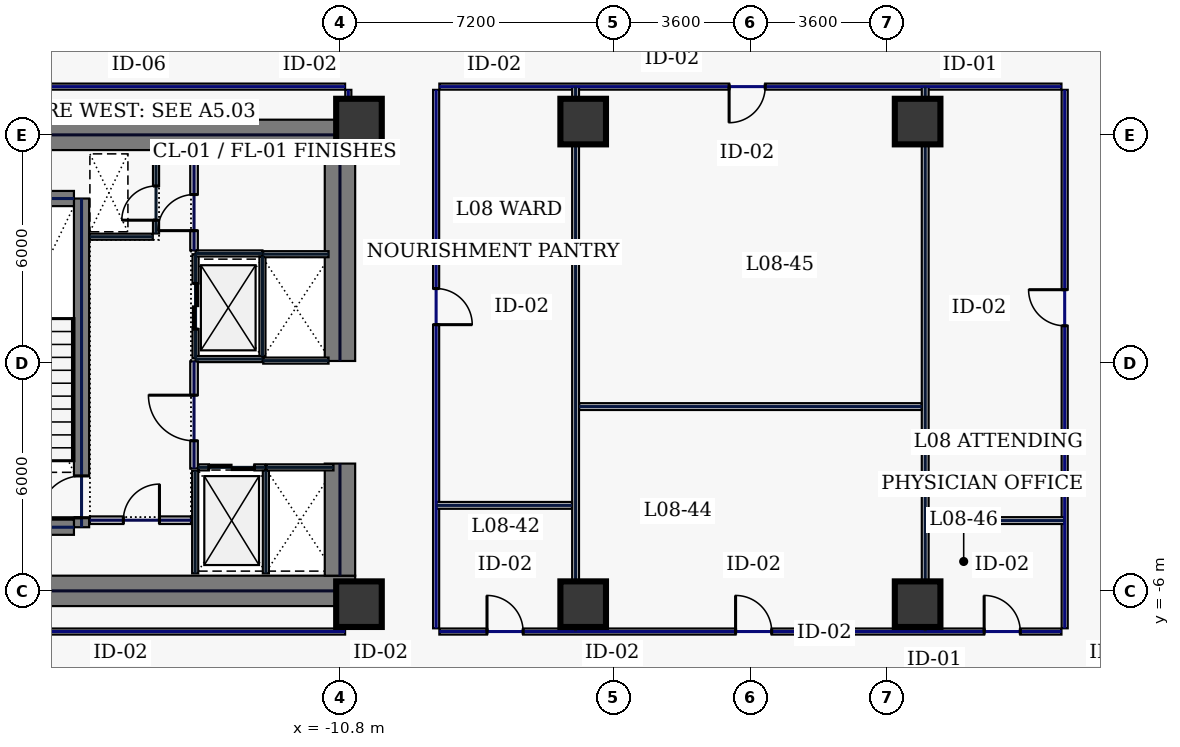
"""IFC4 building model, lengths in metres.
Left out: names, types, materials, properties, quantities, classifications, styles, units other than length and angle.
Written with IfcOpenShell. Run it as: python <this file> out.ifc"""

import sys

from ifc_helpers import new_model, si_unit, direction, frame, frame_2d, origin, origin_2d, place, context, subcontext, project, spatial, rectangle, hollow_rectangle, extrude, element, fill, save


model = new_model("IFC4")
c1 = context("Model", 3, precision=1e-05, world=origin(), true_north=direction((0.0, 1.0)))
c2 = subcontext(c1, "Body", "Model", "MODEL_VIEW")
j1 = project(units=[si_unit("LENGTHUNIT", "METRE"), si_unit("PLANEANGLEUNIT", "RADIAN")], contexts=[c1])
p1 = place(None, origin())
s1 = spatial("IfcSite", under=j1, at=p1, CompositionType="ELEMENT")
p2 = place(p1, origin())
s2 = spatial("IfcBuilding", under=s1, at=p2, CompositionType="ELEMENT")
p3 = place(p2, frame((0.0, 0.0, 43.4)))
s3 = spatial("IfcBuildingStorey", under=s2, at=p3, CompositionType="ELEMENT", Elevation=43.4)
for number, where, z_axis, x_axis in (
    (1, (-22.0, 6.0, 0.0), (0.0, 0.0, 1.0), (1.0, 0.0, 0.0)),
    (2, (-22.0, -6.0, 0.0), (0.0, 0.0, 1.0), (1.0, 0.0, 0.0)),
):
    element("IfcWall", number, at=place(p3, frame(where, z_axis=z_axis, x_axis=x_axis)), inside=s3, PredefinedType="SHEAR", context=c2, shape_type="SweptSolid", body=[
        extrude(rectangle(XDim=11.6, YDim=0.8, at=frame_2d((5.8, 0.0))), origin(), (0.0, 0.0, 1.0), 3.74),
    ])
p4 = place(p3, frame((-10.8, -5.6, 0.0), z_axis=(0.0, 0.0, 1.0), x_axis=(0.0, 1.0, 0.0)))
e3 = element("IfcWall", 3, at=p4, inside=s3, PredefinedType="SHEAR", context=c2, shape_type="SweptSolid", body=[
    extrude(rectangle(XDim=2.95, YDim=0.8, at=frame_2d((1.475, 0.0))), origin(), (0.0, 0.0, 1.0), 3.74),
])
p5 = place(p3, frame((-10.8, 0.05, 0.0), z_axis=(0.0, 0.0, 1.0), x_axis=(0.0, 1.0, 0.0)))
e4 = element("IfcWall", 4, at=p5, inside=s3, PredefinedType="SHEAR", context=c2, shape_type="SweptSolid", body=[
    extrude(rectangle(XDim=5.55, YDim=0.8, at=frame_2d((2.775, 0.0))), origin(), (0.0, 0.0, 1.0), 3.74),
])
p6 = place(p3, frame((-17.6, -4.325, 0.0), z_axis=(0.0, 0.0, 1.0), x_axis=(0.0, 1.0, 0.0)))
e5 = element("IfcWall", 5, at=p6, inside=s3, PredefinedType="SHEAR", context=c2, shape_type="SweptSolid", body=[
    extrude(rectangle(XDim=8.65, YDim=0.4, at=frame_2d((4.325, 0.0))), origin(), (0.0, 0.0, 1.0), 3.74),
])
p7 = place(p6, frame((0.25, 0.0, 0.0)))
e6 = element("IfcOpeningElement", 6, at=p7, cuts=e5, PredefinedType="OPENING", context=c2, shape_type="SweptSolid", body=[
    extrude(rectangle(XDim=1.1, YDim=2.2, at=frame_2d((0.55, 1.1))), frame((0.0, 0.21, 0.0), z_axis=(0.0, -1.0, 0.0), x_axis=(1.0, 0.0, 0.0)), (0.0, 0.0, 1.0), 0.42),
])
for number, where, z_axis, x_axis in (
    (7, (-21.2, -4.325, 0.0), (0.0, 0.0, 1.0), (1.0, 0.0, 0.0)),
    (8, (-21.2, 4.325, 0.0), (0.0, 0.0, 1.0), (1.0, 0.0, 0.0)),
):
    element("IfcWall", number, at=place(p3, frame(where, z_axis=z_axis, x_axis=x_axis)), inside=s3, PredefinedType="SHEAR", context=c2, shape_type="SweptSolid", body=[
        extrude(rectangle(XDim=3.4, YDim=0.4, at=frame_2d((1.7, 0.0))), origin(), (0.0, 0.0, 1.0), 3.74),
    ])
for number, where, z_axis, x_axis in (
    (9, (-10.3, -6.35, 0.0), (0.0, 0.0, 1.0), (1.0, 0.0, 0.0)),
    (10, (-10.3, 6.35, 0.0), (0.0, 0.0, 1.0), (1.0, 0.0, 0.0)),
    (11, (-4.4, -6.35, 0.0), (0.0, 0.0, 1.0), (1.0, 0.0, 0.0)),
    (12, (4.4, -6.35, 0.0), (0.0, 0.0, 1.0), (1.0, 0.0, 0.0)),
    (13, (-4.4, 6.35, 0.0), (0.0, 0.0, 1.0), (1.0, 0.0, 0.0)),
    (14, (4.4, 6.35, 0.0), (0.0, 0.0, 1.0), (1.0, 0.0, 0.0)),
):
    element("IfcColumn", number, at=place(p3, frame(where, z_axis=z_axis, x_axis=x_axis)), inside=s3, PredefinedType="COLUMN", context=c2, shape_type="SweptSolid", body=[
        extrude(hollow_rectangle(XDim=1.2, YDim=1.2, WallThickness=0.05, at=origin_2d()), origin(), (0.0, 0.0, 1.0), 3.74),
    ])
p8 = place(p3, frame((-14.6, 0.12, 0.0), z_axis=(0.0, 0.0, 1.0), x_axis=(0.0, 1.0, 0.0)))
e15 = element("IfcWall", 15, at=p8, inside=s3, PredefinedType="PARTITIONING", context=c2, shape_type="SweptSolid", body=[
    extrude(rectangle(XDim=2.74, YDim=0.16, at=frame_2d((1.37, 0.0))), origin(), (0.0, 0.0, 1.0), 3.74),
])
p9 = place(p8, frame((0.77, 0.0, 0.0)))
e16 = element("IfcOpeningElement", 16, at=p9, cuts=e15, PredefinedType="OPENING", context=c2, shape_type="SweptSolid", body=[
    extrude(rectangle(XDim=1.2, YDim=2.2, at=frame_2d((0.6, 1.1))), frame((0.0, 0.09, 0.0), z_axis=(0.0, -1.0, 0.0), x_axis=(1.0, 0.0, 0.0)), (0.0, 0.0, 1.0), 0.18),
])
for number, where, z_axis, x_axis in (
    (17, (-14.6, 0.1, 0.0), (0.0, 0.0, 1.0), (1.0, 0.0, 0.0)),
    (18, (-14.6, 2.88, 0.0), (0.0, 0.0, 1.0), (1.0, 0.0, 0.0)),
):
    element("IfcWall", number, at=place(p3, frame(where, z_axis=z_axis, x_axis=x_axis)), inside=s3, PredefinedType="PARTITIONING", context=c2, shape_type="SweptSolid", body=[
        extrude(rectangle(XDim=1.76, YDim=0.16, at=frame_2d((0.88, 0.0))), origin(), (0.0, 0.0, 1.0), 3.74),
    ])
p10 = place(p3, frame((-12.84, 0.18, 0.0), z_axis=(0.0, 0.0, 1.0), x_axis=(0.0, 1.0, 0.0)))
e19 = element("IfcWall", 19, at=p10, inside=s3, PredefinedType="PARTITIONING", context=c2, shape_type="SweptSolid", body=[
    extrude(rectangle(XDim=2.62, YDim=0.16, at=frame_2d((1.31, 0.0))), origin(), (0.0, 0.0, 1.0), 3.74),
])
p11 = place(p3, frame((-14.53, -2.75, 0.0), z_axis=(0.0, 0.0, 1.0), x_axis=(1.0, 0.0, 0.0)))
e20 = element("IfcWall", 20, at=p11, inside=s3, PredefinedType="PARTITIONING", context=c2, shape_type="SweptSolid", body=[
    extrude(rectangle(XDim=1.76, YDim=0.16, at=frame_2d((0.88, 0.0))), origin(), (0.0, 0.0, 1.0), 3.74),
])
p12 = place(p11, frame((0.28, 0.0, 0.0)))
e21 = element("IfcOpeningElement", 21, at=p12, cuts=e20, PredefinedType="OPENING", context=c2, shape_type="SweptSolid", body=[
    extrude(rectangle(XDim=1.2, YDim=2.2, at=frame_2d((0.6, 1.1))), frame((0.0, 0.09, 0.0), z_axis=(0.0, -1.0, 0.0), x_axis=(1.0, 0.0, 0.0)), (0.0, 0.0, 1.0), 0.18),
])
for number, where, z_axis, x_axis in (
    (22, (-12.75, -5.54, 0.0), (0.0, 0.0, 1.0), (0.0, 1.0, 0.0)),
    (23, (-14.61, -5.54, 0.0), (0.0, 0.0, 1.0), (0.0, 1.0, 0.0)),
):
    element("IfcWall", number, at=place(p3, frame(where, z_axis=z_axis, x_axis=x_axis)), inside=s3, PredefinedType="PARTITIONING", context=c2, shape_type="SweptSolid", body=[
        extrude(rectangle(XDim=2.7, YDim=0.16, at=frame_2d((1.35, 0.0))), origin(), (0.0, 0.0, 1.0), 3.74),
    ])
p13 = place(p3, frame((-12.73, -2.75, 0.0), z_axis=(0.0, 0.0, 1.0), x_axis=(1.0, 0.0, 0.0)))
e24 = element("IfcWall", 24, at=p13, inside=s3, PredefinedType="PARTITIONING", context=c2, shape_type="SweptSolid", body=[
    extrude(rectangle(XDim=1.76, YDim=0.16, at=frame_2d((0.88, 0.0))), origin(), (0.0, 0.0, 1.0), 3.74),
])
for number, where, z_axis, x_axis in (
    (25, (-12.82, 0.06, 0.0), (0.0, 0.0, 1.0), (1.0, 0.0, 0.0)),
    (26, (-12.82, 2.86, 0.0), (0.0, 0.0, 1.0), (1.0, 0.0, 0.0)),
):
    element("IfcWall", number, at=place(p3, frame(where, z_axis=z_axis, x_axis=x_axis)), inside=s3, PredefinedType="PARTITIONING", context=c2, shape_type="SweptSolid", body=[
        extrude(rectangle(XDim=1.72, YDim=0.16, at=frame_2d((0.86, 0.0))), origin(), (0.0, 0.0, 1.0), 3.74),
    ])
p14 = place(p3, frame((-15.64, 3.405, 0.0), z_axis=(0.0, 0.0, 1.0), x_axis=(0.0, 1.0, 0.0)))
e27 = element("IfcWall", 27, at=p14, inside=s3, PredefinedType="PARTITIONING", context=c2, shape_type="SweptSolid", body=[
    extrude(rectangle(XDim=2.155, YDim=0.16, at=frame_2d((1.078, 0.0))), origin(), (0.0, 0.0, 1.0), 3.74),
])
p15 = place(p14, frame((0.35, 0.0, 0.0)))
e28 = element("IfcOpeningElement", 28, at=p15, cuts=e27, PredefinedType="OPENING", context=c2, shape_type="SweptSolid", body=[
    extrude(rectangle(XDim=0.9, YDim=2.2, at=frame_2d((0.45, 1.1))), frame((0.0, 0.09, 0.0), z_axis=(0.0, -1.0, 0.0), x_axis=(1.0, 0.0, 0.0)), (0.0, 0.0, 1.0), 0.18),
])
p16 = place(p3, frame((-17.38, 3.32, 0.0), z_axis=(0.0, 0.0, 1.0), x_axis=(1.0, 0.0, 0.0)))
e29 = element("IfcWall", 29, at=p16, inside=s3, PredefinedType="PARTITIONING", context=c2, shape_type="SweptSolid", body=[
    extrude(rectangle(XDim=1.655, YDim=0.16, at=frame_2d((0.827, 0.0))), origin(), (0.0, 0.0, 1.0), 3.74),
])
p17 = place(p3, frame((-17.38, -4.14, 0.0), z_axis=(0.0, 0.0, 1.0), x_axis=(1.0, 0.0, 0.0)))
e30 = element("IfcWall", 30, at=p17, inside=s3, PredefinedType="SOLIDWALL", context=c2, shape_type="SweptSolid", body=[
    extrude(rectangle(XDim=2.66, YDim=0.2, at=frame_2d((1.33, 0.0))), origin(), (0.0, 0.0, 1.0), 3.74),
])
p18 = place(p17, frame((0.88, 0.0, 0.0)))
e31 = element("IfcOpeningElement", 31, at=p18, cuts=e30, PredefinedType="OPENING", context=c2, shape_type="SweptSolid", body=[
    extrude(rectangle(XDim=0.95, YDim=2.2, at=frame_2d((0.475, 1.1))), frame((0.0, 0.11, 0.0), z_axis=(0.0, -1.0, 0.0), x_axis=(1.0, 0.0, 0.0)), (0.0, 0.0, 1.0), 0.22),
])
p19 = place(p3, frame((-14.64, 2.96, 0.0), z_axis=(0.0, 0.0, 1.0), x_axis=(0.0, 1.0, 0.0)))
e32 = element("IfcWall", 32, at=p19, inside=s3, PredefinedType="SOLIDWALL", context=c2, shape_type="SweptSolid", body=[
    extrude(rectangle(XDim=2.6, YDim=0.2, at=frame_2d((1.3, 0.0))), origin(), (0.0, 0.0, 1.0), 3.74),
])
p20 = place(p19, frame((0.52, 0.0, 0.0)))
e33 = element("IfcOpeningElement", 33, at=p20, cuts=e32, PredefinedType="OPENING", context=c2, shape_type="SweptSolid", body=[
    extrude(rectangle(XDim=0.95, YDim=2.2, at=frame_2d((0.475, 1.1))), frame((0.0, 0.11, 0.0), z_axis=(0.0, -1.0, 0.0), x_axis=(1.0, 0.0, 0.0)), (0.0, 0.0, 1.0), 0.22),
])
p21 = place(p3, frame((-14.64, -2.78, 0.0), z_axis=(0.0, 0.0, 1.0), x_axis=(0.0, 1.0, 0.0)))
e34 = element("IfcWall", 34, at=p21, inside=s3, PredefinedType="SOLIDWALL", context=c2, shape_type="SweptSolid", body=[
    extrude(rectangle(XDim=2.82, YDim=0.2, at=frame_2d((1.41, 0.0))), origin(), (0.0, 0.0, 1.0), 3.74),
])
p22 = place(p21, frame((0.73, 0.0, 0.0)))
e35 = element("IfcOpeningElement", 35, at=p22, cuts=e34, PredefinedType="OPENING", context=c2, shape_type="SweptSolid", body=[
    extrude(rectangle(XDim=1.2, YDim=2.2, at=frame_2d((0.6, 1.1))), frame((0.0, 0.11, 0.0), z_axis=(0.0, -1.0, 0.0), x_axis=(1.0, 0.0, 0.0)), (0.0, 0.0, 1.0), 0.22),
])
p23 = place(p3, frame((8.27, -6.985, 0.0), z_axis=(0.0, 0.0, 1.0), x_axis=(0.0, 1.0, 0.0)))
e36 = element("IfcWall", 36, at=p23, inside=s3, PredefinedType="PARTITIONING", context=c2, shape_type="SweptSolid", body=[
    extrude(rectangle(XDim=14.17, YDim=0.16, at=frame_2d((7.085, 0.0))), origin(), (0.0, 0.0, 1.0), 3.74),
])
p24 = place(p23, frame((7.961, 0.0, 0.0)))
e37 = element("IfcOpeningElement", 37, at=p24, cuts=e36, PredefinedType="OPENING", context=c2, shape_type="SweptSolid", body=[
    extrude(rectangle(XDim=0.95, YDim=2.2, at=frame_2d((0.475, 1.1))), frame((0.0, 0.09, 0.0), z_axis=(0.0, -1.0, 0.0), x_axis=(1.0, 0.0, 0.0)), (0.0, 0.0, 1.0), 0.18),
])
p25 = place(p3, frame((8.185, 7.27, 0.0), z_axis=(0.0, 0.0, 1.0), x_axis=(-1.0, 0.0, 0.0)))
e38 = element("IfcWall", 38, at=p25, inside=s3, PredefinedType="PARTITIONING", context=c2, shape_type="SweptSolid", body=[
    extrude(rectangle(XDim=16.37, YDim=0.16, at=frame_2d((8.185, 0.0))), origin(), (0.0, 0.0, 1.0), 3.74),
])
p26 = place(p25, frame((7.795, 0.0, 0.0)))
e39 = element("IfcOpeningElement", 39, at=p26, cuts=e38, PredefinedType="OPENING", context=c2, shape_type="SweptSolid", body=[
    extrude(rectangle(XDim=0.95, YDim=2.2, at=frame_2d((0.475, 1.1))), frame((0.0, 0.09, 0.0), z_axis=(0.0, -1.0, 0.0), x_axis=(1.0, 0.0, 0.0)), (0.0, 0.0, 1.0), 0.18),
])
p27 = place(p3, frame((-8.27, 7.185, 0.0), z_axis=(0.0, 0.0, 1.0), x_axis=(0.0, -1.0, 0.0)))
e40 = element("IfcWall", 40, at=p27, inside=s3, PredefinedType="PARTITIONING", context=c2, shape_type="SweptSolid", body=[
    extrude(rectangle(XDim=14.17, YDim=0.16, at=frame_2d((7.085, 0.0))), origin(), (0.0, 0.0, 1.0), 3.74),
])
p28 = place(p27, frame((5.229, 0.0, 0.0)))
e41 = element("IfcOpeningElement", 41, at=p28, cuts=e40, PredefinedType="OPENING", context=c2, shape_type="SweptSolid", body=[
    extrude(rectangle(XDim=0.95, YDim=2.2, at=frame_2d((0.475, 1.1))), frame((0.0, 0.09, 0.0), z_axis=(0.0, -1.0, 0.0), x_axis=(1.0, 0.0, 0.0)), (0.0, 0.0, 1.0), 0.18),
])
p29 = place(p3, frame((-8.185, -7.07, 0.0), z_axis=(0.0, 0.0, 1.0), x_axis=(1.0, 0.0, 0.0)))
e42 = element("IfcWall", 42, at=p29, inside=s3, PredefinedType="PARTITIONING", context=c2, shape_type="SweptSolid", body=[
    extrude(rectangle(XDim=16.37, YDim=0.16, at=frame_2d((8.185, 0.0))), origin(), (0.0, 0.0, 1.0), 3.74),
])
p30 = place(p29, frame((1.254, 0.0, 0.0)))
e43 = element("IfcOpeningElement", 43, at=p30, cuts=e42, PredefinedType="OPENING", context=c2, shape_type="SweptSolid", body=[
    extrude(rectangle(XDim=0.95, YDim=2.2, at=frame_2d((0.475, 1.1))), frame((0.0, 0.09, 0.0), z_axis=(0.0, -1.0, 0.0), x_axis=(1.0, 0.0, 0.0)), (0.0, 0.0, 1.0), 0.18),
])
p31 = place(p29, frame((7.795, 0.0, 0.0)))
e44 = element("IfcOpeningElement", 44, at=p31, cuts=e42, PredefinedType="OPENING", context=c2, shape_type="SweptSolid", body=[
    extrude(rectangle(XDim=0.95, YDim=2.2, at=frame_2d((0.475, 1.1))), frame((0.0, 0.09, 0.0), z_axis=(0.0, -1.0, 0.0), x_axis=(1.0, 0.0, 0.0)), (0.0, 0.0, 1.0), 0.18),
])
p32 = place(p29, frame((14.336, 0.0, 0.0)))
e45 = element("IfcOpeningElement", 45, at=p32, cuts=e42, PredefinedType="OPENING", context=c2, shape_type="SweptSolid", body=[
    extrude(rectangle(XDim=0.95, YDim=2.2, at=frame_2d((0.475, 1.1))), frame((0.0, 0.09, 0.0), z_axis=(0.0, -1.0, 0.0), x_axis=(1.0, 0.0, 0.0)), (0.0, 0.0, 1.0), 0.18),
])
p33 = place(p3, frame((-10.58, -6.985, 0.0), z_axis=(0.0, 0.0, 1.0), x_axis=(0.0, 1.0, 0.0)))
e46 = element("IfcWall", 46, at=p33, inside=s3, PredefinedType="PARTITIONING", context=c2, shape_type="SweptSolid", body=[
    extrude(rectangle(XDim=0.565, YDim=0.16, at=frame_2d((0.283, 0.0))), origin(), (0.0, 0.0, 1.0), 1.535),
])
p34 = place(p3, frame((-10.58, 6.42, 0.0), z_axis=(0.0, 0.0, 1.0), x_axis=(0.0, 1.0, 0.0)))
e47 = element("IfcWall", 47, at=p34, inside=s3, PredefinedType="PARTITIONING", context=c2, shape_type="SweptSolid", body=[
    extrude(rectangle(XDim=0.765, YDim=0.16, at=frame_2d((0.383, 0.0))), origin(), (0.0, 0.0, 1.0), 3.74),
])
for number, where, z_axis, x_axis in (
    (48, (-10.665, 7.27, 0.0), (0.0, 0.0, 1.0), (-1.0, 0.0, 0.0)),
    (49, (-27.185, -7.07, 0.0), (0.0, 0.0, 1.0), (1.0, 0.0, 0.0)),
):
    element("IfcWall", number, at=place(p3, frame(where, z_axis=z_axis, x_axis=x_axis)), inside=s3, PredefinedType="PARTITIONING", context=c2, shape_type="SweptSolid", body=[
        extrude(rectangle(XDim=16.52, YDim=0.16, at=frame_2d((8.26, 0.0))), origin(), (0.0, 0.0, 1.0), 3.74),
    ])
for number, where, z_axis, x_axis in (
    (50, (-4.6, -7.065, 0.0), (0.0, 0.0, 1.0), (0.0, 1.0, 0.0)),
    (51, (4.6, -7.065, 0.0), (0.0, 0.0, 1.0), (0.0, 1.0, 0.0)),
):
    element("IfcWall", number, at=place(p3, frame(where, z_axis=z_axis, x_axis=x_axis)), inside=s3, PredefinedType="PARTITIONING", context=c2, shape_type="SweptSolid", body=[
        extrude(rectangle(XDim=14.33, YDim=0.18, at=frame_2d((7.165, 0.0))), origin(), (0.0, 0.0, 1.0), 2.935),
    ])
p35 = place(p3, frame((-4.505, -1.15, 0.0), z_axis=(0.0, 0.0, 1.0), x_axis=(1.0, 0.0, 0.0)))
e52 = element("IfcWall", 52, at=p35, inside=s3, PredefinedType="PARTITIONING", context=c2, shape_type="SweptSolid", body=[
    extrude(rectangle(XDim=9.01, YDim=0.18, at=frame_2d((4.505, 0.0))), origin(), (0.0, 0.0, 1.0), 3.74),
])
for number, where, z_axis, x_axis in (
    (53, (-8.265, -3.75, 0.0), (0.0, 0.0, 1.0), (1.0, 0.0, 0.0)),
    (54, (4.695, -4.15, 0.0), (0.0, 0.0, 1.0), (1.0, 0.0, 0.0)),
):
    element("IfcWall", number, at=place(p3, frame(where, z_axis=z_axis, x_axis=x_axis)), inside=s3, PredefinedType="PARTITIONING", context=c2, shape_type="SweptSolid", body=[
        extrude(rectangle(XDim=3.57, YDim=0.18, at=frame_2d((1.785, 0.0))), origin(), (0.0, 0.0, 1.0), 3.74),
    ])
p36 = place(p7, origin())
e55 = element("IfcDoor", 55, at=p36, inside=s3, OperationType="SINGLE_SWING_LEFT", PredefinedType="DOOR", context=c2, shape_type="SweptSolid", body=[
    extrude(rectangle(XDim=1.1, YDim=2.2, at=frame_2d((0.55, 1.1))), frame((0.0, 0.025, 0.0), z_axis=(0.0, -1.0, 0.0), x_axis=(1.0, 0.0, 0.0)), (0.0, 0.0, 1.0), 0.05),
])
fill(e6, e55)
p37 = place(p9, origin())
e56 = element("IfcDoor", 56, at=p37, inside=s3, OperationType="SLIDING_TO_LEFT", PredefinedType="DOOR", context=c2, shape_type="SweptSolid", body=[
    extrude(rectangle(XDim=1.2, YDim=2.2, at=frame_2d((0.6, 1.1))), frame((0.0, 0.025, 0.0), z_axis=(0.0, -1.0, 0.0), x_axis=(1.0, 0.0, 0.0)), (0.0, 0.0, 1.0), 0.05),
])
fill(e16, e56)
p38 = place(p12, origin())
e57 = element("IfcDoor", 57, at=p38, inside=s3, OperationType="SLIDING_TO_LEFT", PredefinedType="DOOR", context=c2, shape_type="SweptSolid", body=[
    extrude(rectangle(XDim=1.2, YDim=2.2, at=frame_2d((0.6, 1.1))), frame((0.0, 0.025, 0.0), z_axis=(0.0, -1.0, 0.0), x_axis=(1.0, 0.0, 0.0)), (0.0, 0.0, 1.0), 0.05),
])
fill(e21, e57)
p39 = place(p15, origin())
e58 = element("IfcDoor", 58, at=p39, inside=s3, OperationType="SINGLE_SWING_LEFT", PredefinedType="DOOR", context=c2, shape_type="SweptSolid", body=[
    extrude(rectangle(XDim=0.9, YDim=2.2, at=frame_2d((0.45, 1.1))), frame((0.0, 0.025, 0.0), z_axis=(0.0, -1.0, 0.0), x_axis=(1.0, 0.0, 0.0)), (0.0, 0.0, 1.0), 0.05),
])
fill(e28, e58)
p40 = place(p18, origin())
e59 = element("IfcDoor", 59, at=p40, inside=s3, OperationType="SINGLE_SWING_RIGHT", PredefinedType="DOOR", context=c2, shape_type="SweptSolid", body=[
    extrude(rectangle(XDim=0.95, YDim=2.2, at=frame_2d((0.475, 1.1))), frame((0.0, 0.025, 0.0), z_axis=(0.0, -1.0, 0.0), x_axis=(1.0, 0.0, 0.0)), (0.0, 0.0, 1.0), 0.05),
])
fill(e31, e59)
p41 = place(p20, origin())
e60 = element("IfcDoor", 60, at=p41, inside=s3, OperationType="SINGLE_SWING_LEFT", PredefinedType="DOOR", context=c2, shape_type="SweptSolid", body=[
    extrude(rectangle(XDim=0.95, YDim=2.2, at=frame_2d((0.475, 1.1))), frame((0.0, 0.025, 0.0), z_axis=(0.0, -1.0, 0.0), x_axis=(1.0, 0.0, 0.0)), (0.0, 0.0, 1.0), 0.05),
])
fill(e33, e60)
p42 = place(p22, origin())
e61 = element("IfcDoor", 61, at=p42, inside=s3, OperationType="SINGLE_SWING_RIGHT", PredefinedType="DOOR", context=c2, shape_type="SweptSolid", body=[
    extrude(rectangle(XDim=1.2, YDim=2.2, at=frame_2d((0.6, 1.1))), frame((0.0, 0.025, 0.0), z_axis=(0.0, -1.0, 0.0), x_axis=(1.0, 0.0, 0.0)), (0.0, 0.0, 1.0), 0.05),
])
fill(e35, e61)
p43 = place(p30, origin())
e62 = element("IfcDoor", 62, at=p43, inside=s3, OperationType="SINGLE_SWING_LEFT", PredefinedType="DOOR", context=c2, shape_type="SweptSolid", body=[
    extrude(rectangle(XDim=0.95, YDim=2.2, at=frame_2d((0.475, 1.1))), frame((0.0, 0.025, 0.0), z_axis=(0.0, -1.0, 0.0), x_axis=(1.0, 0.0, 0.0)), (0.0, 0.0, 1.0), 0.05),
])
fill(e43, e62)
p44 = place(p28, origin())
e63 = element("IfcDoor", 63, at=p44, inside=s3, OperationType="SINGLE_SWING_RIGHT", PredefinedType="DOOR", context=c2, shape_type="SweptSolid", body=[
    extrude(rectangle(XDim=0.95, YDim=2.2, at=frame_2d((0.475, 1.1))), frame((0.0, 0.025, 0.0), z_axis=(0.0, -1.0, 0.0), x_axis=(1.0, 0.0, 0.0)), (0.0, 0.0, 1.0), 0.05),
])
fill(e41, e63)
p45 = place(p31, origin())
e64 = element("IfcDoor", 64, at=p45, inside=s3, OperationType="SINGLE_SWING_LEFT", PredefinedType="DOOR", context=c2, shape_type="SweptSolid", body=[
    extrude(rectangle(XDim=0.95, YDim=2.2, at=frame_2d((0.475, 1.1))), frame((0.0, 0.025, 0.0), z_axis=(0.0, -1.0, 0.0), x_axis=(1.0, 0.0, 0.0)), (0.0, 0.0, 1.0), 0.05),
])
fill(e44, e64)
p46 = place(p26, origin())
e65 = element("IfcDoor", 65, at=p46, inside=s3, OperationType="SINGLE_SWING_RIGHT", PredefinedType="DOOR", context=c2, shape_type="SweptSolid", body=[
    extrude(rectangle(XDim=0.95, YDim=2.2, at=frame_2d((0.475, 1.1))), frame((0.0, 0.025, 0.0), z_axis=(0.0, -1.0, 0.0), x_axis=(1.0, 0.0, 0.0)), (0.0, 0.0, 1.0), 0.05),
])
fill(e39, e65)
p47 = place(p32, origin())
e66 = element("IfcDoor", 66, at=p47, inside=s3, OperationType="SINGLE_SWING_LEFT", PredefinedType="DOOR", context=c2, shape_type="SweptSolid", body=[
    extrude(rectangle(XDim=0.95, YDim=2.2, at=frame_2d((0.475, 1.1))), frame((0.0, 0.025, 0.0), z_axis=(0.0, -1.0, 0.0), x_axis=(1.0, 0.0, 0.0)), (0.0, 0.0, 1.0), 0.05),
])
fill(e45, e66)
p48 = place(p24, origin())
e67 = element("IfcDoor", 67, at=p48, inside=s3, OperationType="SINGLE_SWING_RIGHT", PredefinedType="DOOR", context=c2, shape_type="SweptSolid", body=[
    extrude(rectangle(XDim=0.95, YDim=2.2, at=frame_2d((0.475, 1.1))), frame((0.0, 0.025, 0.0), z_axis=(0.0, -1.0, 0.0), x_axis=(1.0, 0.0, 0.0)), (0.0, 0.0, 1.0), 0.05),
])
fill(e37, e67)
save(model, sys.argv[1])
